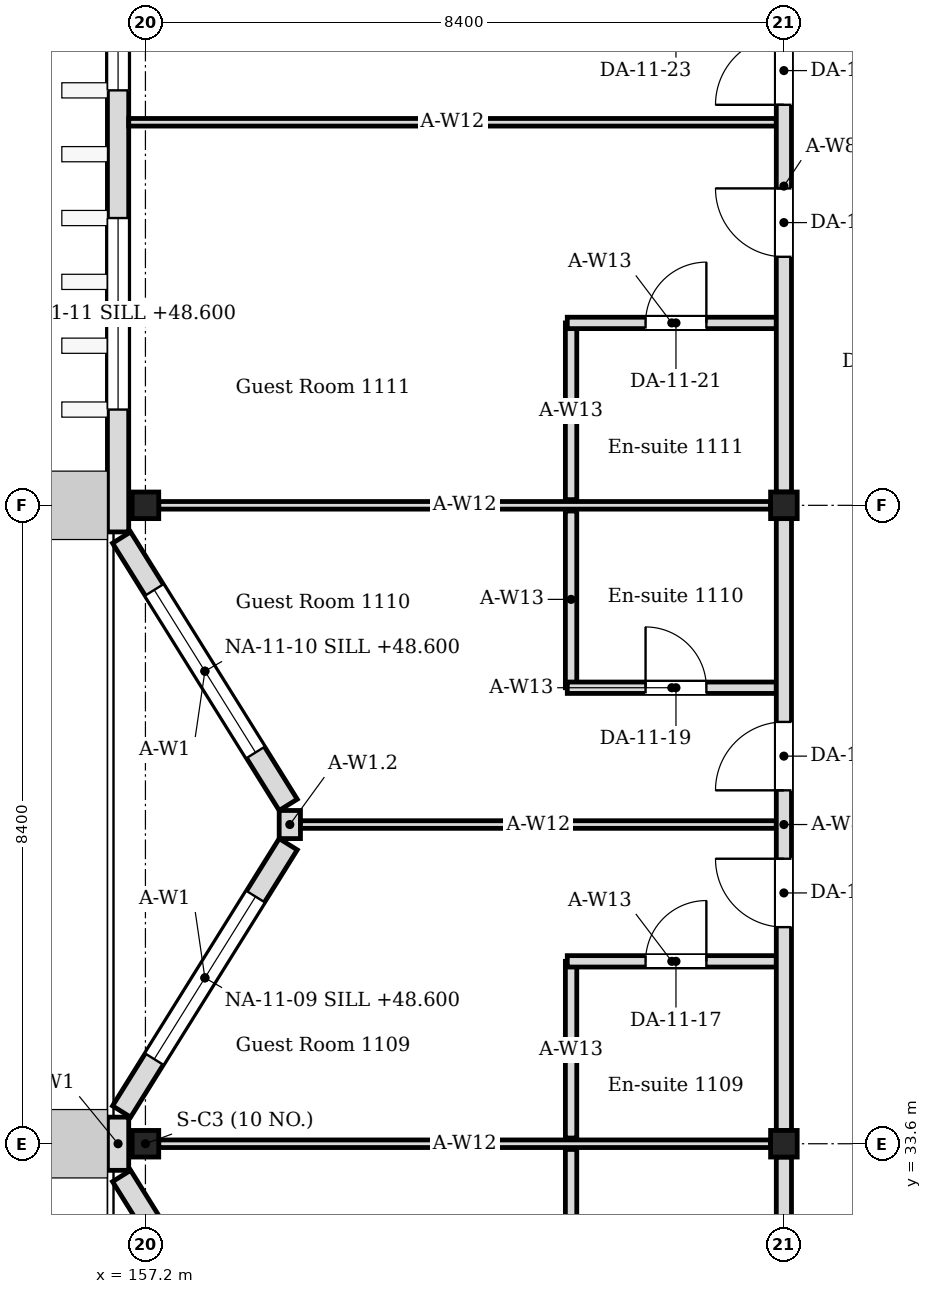
"""IFC4 building model, lengths in metres.
Left out: names, types, materials, properties, quantities, classifications, styles, units other than length and angle.
Written with IfcOpenShell. Run it as: python <this file> out.ifc"""

import sys

from ifc_helpers import new_model, si_unit, direction, frame, frame_2d, origin, origin_2d, place, context, subcontext, project, spatial, rectangle, i_section, extrude, element, fill, save


model = new_model("IFC4")
c1 = context("Model", 3, precision=1e-05, world=origin(), true_north=direction((0.0, 1.0)))
c2 = subcontext(c1, "Body", "Model", "MODEL_VIEW")
j1 = project(units=[si_unit("LENGTHUNIT", "METRE"), si_unit("PLANEANGLEUNIT", "RADIAN")], contexts=[c1])
p1 = place(None, origin())
s1 = spatial("IfcSite", under=j1, at=p1, CompositionType="ELEMENT")
p2 = place(p1, origin())
s2 = spatial("IfcBuilding", under=s1, at=p2, CompositionType="ELEMENT")
p3 = place(p2, frame((0.0, 0.0, 48.0)))
s3 = spatial("IfcBuildingStorey", under=s2, at=p3, CompositionType="ELEMENT", Elevation=48.0)
for number, where, z_axis, x_axis in (
    (1, (157.2, 33.6, 0.0), (0.0, 0.0, 1.0), (1.0, 0.0, 0.0)),
    (2, (157.2, 42.0, 0.0), (0.0, 0.0, 1.0), (1.0, 0.0, 0.0)),
    (3, (165.6, 33.6, 0.0), (0.0, 0.0, 1.0), (1.0, 0.0, 0.0)),
    (4, (165.6, 42.0, 0.0), (0.0, 0.0, 1.0), (1.0, 0.0, 0.0)),
):
    element("IfcColumn", number, at=place(p3, frame(where, z_axis=z_axis, x_axis=x_axis)), inside=s3, PredefinedType="COLUMN", context=c2, shape_type="SweptSolid", body=[
        extrude(i_section(OverallWidth=0.35, OverallDepth=0.35, WebThickness=0.012, FlangeThickness=0.019, FilletRadius=0.013, at=origin_2d()), origin(), (0.0, 0.0, 1.0), 4.2),
    ])
p4 = place(p3, frame((159.079, 29.659, 0.0), z_axis=(0.0, 0.0, 1.0), x_axis=(-0.529018946142, 0.848610013271, 0.0)))
e5 = element("IfcWall", 5, at=p4, inside=s3, PredefinedType="SOLIDWALL", context=c2, shape_type="SweptSolid", body=[
    extrude(rectangle(XDim=4.144, YDim=0.28, at=frame_2d((2.072, 0.0))), origin(), (0.0, 0.0, 1.0), 4.05),
])
p5 = place(p4, frame((0.812, 0.0, 0.6)))
e6 = element("IfcOpeningElement", 6, at=p5, cuts=e5, PredefinedType="OPENING", context=c2, shape_type="SweptSolid", body=[
    extrude(rectangle(XDim=2.52, YDim=2.4, at=frame_2d((1.26, 1.2))), frame((0.0, 0.15, 0.0), z_axis=(0.0, -1.0, 0.0), x_axis=(1.0, 0.0, 0.0)), (0.0, 0.0, 1.0), 0.3),
])
p6 = place(p3, frame((156.84, 33.25, 0.0), z_axis=(0.0, 0.0, 1.0), x_axis=(0.0, 1.0, 0.0)))
e7 = element("IfcWall", 7, at=p6, inside=s3, PredefinedType="SOLIDWALL", context=c2, shape_type="SweptSolid", body=[
    extrude(rectangle(XDim=0.7, YDim=0.28, at=frame_2d((0.35, 0.0))), origin(), (0.0, 0.0, 1.0), 4.05),
])
p7 = place(p3, frame((156.886, 34.024, 0.0), z_axis=(0.0, 0.0, 1.0), x_axis=(0.529018946142, 0.848610013271, 0.0)))
e8 = element("IfcWall", 8, at=p7, inside=s3, PredefinedType="SOLIDWALL", context=c2, shape_type="SweptSolid", body=[
    extrude(rectangle(XDim=4.144, YDim=0.28, at=frame_2d((2.072, 0.0))), origin(), (0.0, 0.0, 1.0), 4.05),
])
p8 = place(p7, frame((0.812, 0.0, 0.6)))
e9 = element("IfcOpeningElement", 9, at=p8, cuts=e8, PredefinedType="OPENING", context=c2, shape_type="SweptSolid", body=[
    extrude(rectangle(XDim=2.52, YDim=2.4, at=frame_2d((1.26, 1.2))), frame((0.0, 0.15, 0.0), z_axis=(0.0, -1.0, 0.0), x_axis=(1.0, 0.0, 0.0)), (0.0, 0.0, 1.0), 0.3),
])
p9 = place(p3, frame((159.079, 38.059, 0.0), z_axis=(0.0, 0.0, 1.0), x_axis=(-0.529018946142, 0.848610013271, 0.0)))
e10 = element("IfcWall", 10, at=p9, inside=s3, PredefinedType="SOLIDWALL", context=c2, shape_type="SweptSolid", body=[
    extrude(rectangle(XDim=4.144, YDim=0.28, at=frame_2d((2.072, 0.0))), origin(), (0.0, 0.0, 1.0), 4.05),
])
p10 = place(p9, frame((0.812, 0.0, 0.6)))
e11 = element("IfcOpeningElement", 11, at=p10, cuts=e10, PredefinedType="OPENING", context=c2, shape_type="SweptSolid", body=[
    extrude(rectangle(XDim=2.52, YDim=2.4, at=frame_2d((1.26, 1.2))), frame((0.0, 0.15, 0.0), z_axis=(0.0, -1.0, 0.0), x_axis=(1.0, 0.0, 0.0)), (0.0, 0.0, 1.0), 0.3),
])
p11 = place(p3, frame((159.1, 37.615, 0.0), z_axis=(0.0, 0.0, 1.0), x_axis=(0.0, 1.0, 0.0)))
e12 = element("IfcWall", 12, at=p11, inside=s3, PredefinedType="SOLIDWALL", context=c2, shape_type="SweptSolid", body=[
    extrude(rectangle(XDim=0.37, YDim=0.28, at=frame_2d((0.185, 0.0))), origin(), (0.0, 0.0, 1.0), 3.604),
])
p12 = place(p3, frame((156.84, 41.65, 0.0), z_axis=(0.0, 0.0, 1.0), x_axis=(0.0, 1.0, 0.0)))
e13 = element("IfcWall", 13, at=p12, inside=s3, PredefinedType="SOLIDWALL", context=c2, shape_type="SweptSolid", body=[
    extrude(rectangle(XDim=25.77, YDim=0.28, at=frame_2d((12.885, 0.0))), origin(), (0.0, 0.0, 1.0), 4.05),
])
p13 = place(p12, frame((1.61, 0.0, 0.6)))
e14 = element("IfcOpeningElement", 14, at=p13, cuts=e13, PredefinedType="OPENING", context=c2, shape_type="SweptSolid", body=[
    extrude(rectangle(XDim=2.52, YDim=2.4, at=frame_2d((1.26, 1.2))), frame((0.0, 0.15, 0.0), z_axis=(0.0, -1.0, 0.0), x_axis=(1.0, 0.0, 0.0)), (0.0, 0.0, 1.0), 0.3),
])
p14 = place(p12, frame((5.81, 0.0, 0.6)))
e15 = element("IfcOpeningElement", 15, at=p14, cuts=e13, PredefinedType="OPENING", context=c2, shape_type="SweptSolid", body=[
    extrude(rectangle(XDim=2.52, YDim=2.4, at=frame_2d((1.26, 1.2))), frame((0.0, 0.15, 0.0), z_axis=(0.0, -1.0, 0.0), x_axis=(1.0, 0.0, 0.0)), (0.0, 0.0, 1.0), 0.3),
])
p15 = place(p12, frame((9.17, 0.0, 0.6)))
e16 = element("IfcOpeningElement", 16, at=p15, cuts=e13, PredefinedType="OPENING", context=c2, shape_type="SweptSolid", body=[
    extrude(rectangle(XDim=2.52, YDim=2.4, at=frame_2d((1.26, 1.2))), frame((0.0, 0.15, 0.0), z_axis=(0.0, -1.0, 0.0), x_axis=(1.0, 0.0, 0.0)), (0.0, 0.0, 1.0), 0.3),
])
p16 = place(p12, frame((13.37, 0.0, 0.6)))
e17 = element("IfcOpeningElement", 17, at=p16, cuts=e13, PredefinedType="OPENING", context=c2, shape_type="SweptSolid", body=[
    extrude(rectangle(XDim=2.52, YDim=2.4, at=frame_2d((1.26, 1.2))), frame((0.0, 0.15, 0.0), z_axis=(0.0, -1.0, 0.0), x_axis=(1.0, 0.0, 0.0)), (0.0, 0.0, 1.0), 0.3),
])
p17 = place(p12, frame((18.41, 0.0, 0.6)))
e18 = element("IfcOpeningElement", 18, at=p17, cuts=e13, PredefinedType="OPENING", context=c2, shape_type="SweptSolid", body=[
    extrude(rectangle(XDim=2.52, YDim=2.4, at=frame_2d((1.26, 1.2))), frame((0.0, 0.15, 0.0), z_axis=(0.0, -1.0, 0.0), x_axis=(1.0, 0.0, 0.0)), (0.0, 0.0, 1.0), 0.3),
])
p18 = place(p12, frame((22.61, 0.0, 0.6)))
e19 = element("IfcOpeningElement", 19, at=p18, cuts=e13, PredefinedType="OPENING", context=c2, shape_type="SweptSolid", body=[
    extrude(rectangle(XDim=2.52, YDim=2.4, at=frame_2d((1.26, 1.2))), frame((0.0, 0.15, 0.0), z_axis=(0.0, -1.0, 0.0), x_axis=(1.0, 0.0, 0.0)), (0.0, 0.0, 1.0), 0.3),
])
for number, where, z_axis, x_axis in (
    (20, (162.8, 31.2, 0.0), (0.0, 0.0, 1.0), (0.0, 1.0, 0.0)),
    (21, (162.8, 33.675, 0.0), (0.0, 0.0, 1.0), (0.0, 1.0, 0.0)),
):
    element("IfcWall", number, at=place(p3, frame(where, z_axis=z_axis, x_axis=x_axis)), inside=s3, PredefinedType="PARTITIONING", context=c2, shape_type="SweptSolid", body=[
        extrude(rectangle(XDim=2.325, YDim=0.15, at=frame_2d((1.163, 0.0))), origin(), (0.0, 0.0, 1.0), 4.05),
    ])
p19 = place(p3, frame((162.75, 36.0, 0.0), z_axis=(0.0, 0.0, 1.0), x_axis=(1.0, 0.0, 0.0)))
e22 = element("IfcWall", 22, at=p19, inside=s3, PredefinedType="PARTITIONING", context=c2, shape_type="SweptSolid", body=[
    extrude(rectangle(XDim=2.75, YDim=0.15, at=frame_2d((1.375, 0.0))), origin(), (0.0, 0.0, 1.0), 4.05),
])
p20 = place(p19, frame((1.03, 0.0, 0.0)))
e23 = element("IfcOpeningElement", 23, at=p20, cuts=e22, PredefinedType="OPENING", context=c2, shape_type="SweptSolid", body=[
    extrude(rectangle(XDim=0.8, YDim=2.1, at=frame_2d((0.4, 1.05))), frame((0.0, 0.085, 0.0), z_axis=(0.0, -1.0, 0.0), x_axis=(1.0, 0.0, 0.0)), (0.0, 0.0, 1.0), 0.17),
])
p21 = place(p3, frame((162.8, 39.6, 0.0), z_axis=(0.0, 0.0, 1.0), x_axis=(0.0, 1.0, 0.0)))
e24 = element("IfcWall", 24, at=p21, inside=s3, PredefinedType="PARTITIONING", context=c2, shape_type="SweptSolid", body=[
    extrude(rectangle(XDim=2.325, YDim=0.15, at=frame_2d((1.163, 0.0))), origin(), (0.0, 0.0, 1.0), 4.05),
])
p22 = place(p3, frame((162.75, 39.6, 0.0), z_axis=(0.0, 0.0, 1.0), x_axis=(1.0, 0.0, 0.0)))
e25 = element("IfcWall", 25, at=p22, inside=s3, PredefinedType="PARTITIONING", context=c2, shape_type="SweptSolid", body=[
    extrude(rectangle(XDim=2.75, YDim=0.15, at=frame_2d((1.375, 0.0))), origin(), (0.0, 0.0, 1.0), 4.05),
])
p23 = place(p22, frame((1.03, 0.0, 0.0)))
e26 = element("IfcOpeningElement", 26, at=p23, cuts=e25, PredefinedType="OPENING", context=c2, shape_type="SweptSolid", body=[
    extrude(rectangle(XDim=0.8, YDim=2.1, at=frame_2d((0.4, 1.05))), frame((0.0, 0.085, 0.0), z_axis=(0.0, -1.0, 0.0), x_axis=(1.0, 0.0, 0.0)), (0.0, 0.0, 1.0), 0.17),
])
p24 = place(p3, frame((162.8, 42.075, 0.0), z_axis=(0.0, 0.0, 1.0), x_axis=(0.0, 1.0, 0.0)))
e27 = element("IfcWall", 27, at=p24, inside=s3, PredefinedType="PARTITIONING", context=c2, shape_type="SweptSolid", body=[
    extrude(rectangle(XDim=2.325, YDim=0.15, at=frame_2d((1.163, 0.0))), origin(), (0.0, 0.0, 1.0), 4.05),
])
p25 = place(p3, frame((162.75, 44.4, 0.0), z_axis=(0.0, 0.0, 1.0), x_axis=(1.0, 0.0, 0.0)))
e28 = element("IfcWall", 28, at=p25, inside=s3, PredefinedType="PARTITIONING", context=c2, shape_type="SweptSolid", body=[
    extrude(rectangle(XDim=2.75, YDim=0.15, at=frame_2d((1.375, 0.0))), origin(), (0.0, 0.0, 1.0), 4.05),
])
p26 = place(p25, frame((1.03, 0.0, 0.0)))
e29 = element("IfcOpeningElement", 29, at=p26, cuts=e28, PredefinedType="OPENING", context=c2, shape_type="SweptSolid", body=[
    extrude(rectangle(XDim=0.8, YDim=2.1, at=frame_2d((0.4, 1.05))), frame((0.0, 0.085, 0.0), z_axis=(0.0, -1.0, 0.0), x_axis=(1.0, 0.0, 0.0)), (0.0, 0.0, 1.0), 0.17),
])
for number, where, z_axis, x_axis in (
    (30, (157.375, 33.6, 0.0), (0.0, 0.0, 1.0), (1.0, 0.0, 0.0)),
    (31, (157.375, 42.0, 0.0), (0.0, 0.0, 1.0), (1.0, 0.0, 0.0)),
):
    element("IfcWall", number, at=place(p3, frame(where, z_axis=z_axis, x_axis=x_axis)), inside=s3, PredefinedType="PARTITIONING", context=c2, shape_type="SweptSolid", body=[
        extrude(rectangle(XDim=8.05, YDim=0.1, at=frame_2d((4.025, 0.0))), origin(), (0.0, 0.0, 1.0), 3.604),
    ])
p27 = place(p3, frame((159.24, 37.8, 0.0), z_axis=(0.0, 0.0, 1.0), x_axis=(1.0, 0.0, 0.0)))
e32 = element("IfcWall", 32, at=p27, inside=s3, PredefinedType="PARTITIONING", context=c2, shape_type="SweptSolid", body=[
    extrude(rectangle(XDim=6.26, YDim=0.1, at=frame_2d((3.13, 0.0))), origin(), (0.0, 0.0, 1.0), 3.604),
])
p28 = place(p3, frame((156.98, 47.04, 0.0), z_axis=(0.0, 0.0, 1.0), x_axis=(1.0, 0.0, 0.0)))
e33 = element("IfcWall", 33, at=p28, inside=s3, PredefinedType="PARTITIONING", context=c2, shape_type="SweptSolid", body=[
    extrude(rectangle(XDim=8.52, YDim=0.1, at=frame_2d((4.26, 0.0))), origin(), (0.0, 0.0, 1.0), 3.604),
])
p29 = place(p3, frame((165.6, 25.375, 0.0), z_axis=(0.0, 0.0, 1.0), x_axis=(0.0, 1.0, 0.0)))
e34 = element("IfcWall", 34, at=p29, inside=s3, PredefinedType="PARTITIONING", context=c2, shape_type="SweptSolid", body=[
    extrude(rectangle(XDim=8.05, YDim=0.2, at=frame_2d((4.025, 0.0))), origin(), (0.0, 0.0, 1.0), 3.45),
])
p30 = place(p29, frame((2.675, 0.0, 0.0)))
e35 = element("IfcOpeningElement", 35, at=p30, cuts=e34, PredefinedType="OPENING", context=c2, shape_type="SweptSolid", body=[
    extrude(rectangle(XDim=0.9, YDim=2.1, at=frame_2d((0.45, 1.05))), frame((0.0, 0.11, 0.0), z_axis=(0.0, -1.0, 0.0), x_axis=(1.0, 0.0, 0.0)), (0.0, 0.0, 1.0), 0.22),
])
p31 = place(p29, frame((4.475, 0.0, 0.0)))
e36 = element("IfcOpeningElement", 36, at=p31, cuts=e34, PredefinedType="OPENING", context=c2, shape_type="SweptSolid", body=[
    extrude(rectangle(XDim=0.9, YDim=2.1, at=frame_2d((0.45, 1.05))), frame((0.0, 0.11, 0.0), z_axis=(0.0, -1.0, 0.0), x_axis=(1.0, 0.0, 0.0)), (0.0, 0.0, 1.0), 0.22),
])
p32 = place(p3, frame((165.6, 33.775, 0.0), z_axis=(0.0, 0.0, 1.0), x_axis=(0.0, 1.0, 0.0)))
e37 = element("IfcWall", 37, at=p32, inside=s3, PredefinedType="PARTITIONING", context=c2, shape_type="SweptSolid", body=[
    extrude(rectangle(XDim=8.05, YDim=0.2, at=frame_2d((4.025, 0.0))), origin(), (0.0, 0.0, 1.0), 3.45),
])
p33 = place(p32, frame((2.675, 0.0, 0.0)))
e38 = element("IfcOpeningElement", 38, at=p33, cuts=e37, PredefinedType="OPENING", context=c2, shape_type="SweptSolid", body=[
    extrude(rectangle(XDim=0.9, YDim=2.1, at=frame_2d((0.45, 1.05))), frame((0.0, 0.11, 0.0), z_axis=(0.0, -1.0, 0.0), x_axis=(1.0, 0.0, 0.0)), (0.0, 0.0, 1.0), 0.22),
])
p34 = place(p32, frame((4.475, 0.0, 0.0)))
e39 = element("IfcOpeningElement", 39, at=p34, cuts=e37, PredefinedType="OPENING", context=c2, shape_type="SweptSolid", body=[
    extrude(rectangle(XDim=0.9, YDim=2.1, at=frame_2d((0.45, 1.05))), frame((0.0, 0.11, 0.0), z_axis=(0.0, -1.0, 0.0), x_axis=(1.0, 0.0, 0.0)), (0.0, 0.0, 1.0), 0.22),
])
p35 = place(p3, frame((165.6, 42.175, 0.0), z_axis=(0.0, 0.0, 1.0), x_axis=(0.0, 1.0, 0.0)))
e40 = element("IfcWall", 40, at=p35, inside=s3, PredefinedType="PARTITIONING", context=c2, shape_type="SweptSolid", body=[
    extrude(rectangle(XDim=8.05, YDim=0.2, at=frame_2d((4.025, 0.0))), origin(), (0.0, 0.0, 1.0), 3.45),
])
p36 = place(p35, frame((3.095, 0.0, 0.0)))
e41 = element("IfcOpeningElement", 41, at=p36, cuts=e40, PredefinedType="OPENING", context=c2, shape_type="SweptSolid", body=[
    extrude(rectangle(XDim=0.9, YDim=2.1, at=frame_2d((0.45, 1.05))), frame((0.0, 0.11, 0.0), z_axis=(0.0, -1.0, 0.0), x_axis=(1.0, 0.0, 0.0)), (0.0, 0.0, 1.0), 0.22),
])
p37 = place(p35, frame((5.095, 0.0, 0.0)))
e42 = element("IfcOpeningElement", 42, at=p37, cuts=e40, PredefinedType="OPENING", context=c2, shape_type="SweptSolid", body=[
    extrude(rectangle(XDim=0.9, YDim=2.1, at=frame_2d((0.45, 1.05))), frame((0.0, 0.11, 0.0), z_axis=(0.0, -1.0, 0.0), x_axis=(1.0, 0.0, 0.0)), (0.0, 0.0, 1.0), 0.22),
])
p38 = place(p8, origin())
e43 = element("IfcWindow", 43, at=p38, inside=s3, PartitioningType="SINGLE_PANEL", PredefinedType="WINDOW", context=c2, shape_type="SweptSolid", body=[
    extrude(rectangle(XDim=2.52, YDim=2.4, at=frame_2d((1.26, 1.2))), frame((0.0, 0.03, 0.0), z_axis=(0.0, -1.0, 0.0), x_axis=(1.0, 0.0, 0.0)), (0.0, 0.0, 1.0), 0.06),
])
fill(e9, e43)
p39 = place(p10, origin())
e44 = element("IfcWindow", 44, at=p39, inside=s3, PartitioningType="SINGLE_PANEL", PredefinedType="WINDOW", context=c2, shape_type="SweptSolid", body=[
    extrude(rectangle(XDim=2.52, YDim=2.4, at=frame_2d((1.26, 1.2))), frame((0.0, 0.03, 0.0), z_axis=(0.0, -1.0, 0.0), x_axis=(1.0, 0.0, 0.0)), (0.0, 0.0, 1.0), 0.06),
])
fill(e11, e44)
p40 = place(p13, origin())
e45 = element("IfcWindow", 45, at=p40, inside=s3, PartitioningType="SINGLE_PANEL", PredefinedType="WINDOW", context=c2, shape_type="SweptSolid", body=[
    extrude(rectangle(XDim=2.52, YDim=2.4, at=frame_2d((1.26, 1.2))), frame((0.0, 0.03, 0.0), z_axis=(0.0, -1.0, 0.0), x_axis=(1.0, 0.0, 0.0)), (0.0, 0.0, 1.0), 0.06),
])
fill(e14, e45)
p41 = place(p14, origin())
e46 = element("IfcWindow", 46, at=p41, inside=s3, PartitioningType="SINGLE_PANEL", PredefinedType="WINDOW", context=c2, shape_type="SweptSolid", body=[
    extrude(rectangle(XDim=2.52, YDim=2.4, at=frame_2d((1.26, 1.2))), frame((0.0, 0.03, 0.0), z_axis=(0.0, -1.0, 0.0), x_axis=(1.0, 0.0, 0.0)), (0.0, 0.0, 1.0), 0.06),
])
fill(e15, e46)
p42 = place(p20, origin())
e47 = element("IfcDoor", 47, at=p42, inside=s3, OperationType="SINGLE_SWING_RIGHT", PredefinedType="DOOR", context=c2, shape_type="SweptSolid", body=[
    extrude(rectangle(XDim=0.8, YDim=2.1, at=frame_2d((0.4, 1.05))), frame((0.0, 0.025, 0.0), z_axis=(0.0, -1.0, 0.0), x_axis=(1.0, 0.0, 0.0)), (0.0, 0.0, 1.0), 0.05),
])
fill(e23, e47)
p43 = place(p33, origin())
e48 = element("IfcDoor", 48, at=p43, inside=s3, OperationType="SINGLE_SWING_RIGHT", PredefinedType="DOOR", context=c2, shape_type="SweptSolid", body=[
    extrude(rectangle(XDim=0.9, YDim=2.1, at=frame_2d((0.45, 1.05))), frame((0.0, 0.025, 0.0), z_axis=(0.0, -1.0, 0.0), x_axis=(1.0, 0.0, 0.0)), (0.0, 0.0, 1.0), 0.05),
])
fill(e38, e48)
p44 = place(p23, origin())
e49 = element("IfcDoor", 49, at=p44, inside=s3, OperationType="SINGLE_SWING_LEFT", PredefinedType="DOOR", context=c2, shape_type="SweptSolid", body=[
    extrude(rectangle(XDim=0.8, YDim=2.1, at=frame_2d((0.4, 1.05))), frame((0.0, 0.025, 0.0), z_axis=(0.0, -1.0, 0.0), x_axis=(1.0, 0.0, 0.0)), (0.0, 0.0, 1.0), 0.05),
])
fill(e26, e49)
p45 = place(p34, origin())
e50 = element("IfcDoor", 50, at=p45, inside=s3, OperationType="SINGLE_SWING_LEFT", PredefinedType="DOOR", context=c2, shape_type="SweptSolid", body=[
    extrude(rectangle(XDim=0.9, YDim=2.1, at=frame_2d((0.45, 1.05))), frame((0.0, 0.025, 0.0), z_axis=(0.0, -1.0, 0.0), x_axis=(1.0, 0.0, 0.0)), (0.0, 0.0, 1.0), 0.05),
])
fill(e39, e50)
p46 = place(p26, origin())
e51 = element("IfcDoor", 51, at=p46, inside=s3, OperationType="SINGLE_SWING_RIGHT", PredefinedType="DOOR", context=c2, shape_type="SweptSolid", body=[
    extrude(rectangle(XDim=0.8, YDim=2.1, at=frame_2d((0.4, 1.05))), frame((0.0, 0.025, 0.0), z_axis=(0.0, -1.0, 0.0), x_axis=(1.0, 0.0, 0.0)), (0.0, 0.0, 1.0), 0.05),
])
fill(e29, e51)
p47 = place(p36, origin())
e52 = element("IfcDoor", 52, at=p47, inside=s3, OperationType="SINGLE_SWING_RIGHT", PredefinedType="DOOR", context=c2, shape_type="SweptSolid", body=[
    extrude(rectangle(XDim=0.9, YDim=2.1, at=frame_2d((0.45, 1.05))), frame((0.0, 0.025, 0.0), z_axis=(0.0, -1.0, 0.0), x_axis=(1.0, 0.0, 0.0)), (0.0, 0.0, 1.0), 0.05),
])
fill(e41, e52)
p48 = place(p37, origin())
e53 = element("IfcDoor", 53, at=p48, inside=s3, OperationType="SINGLE_SWING_LEFT", PredefinedType="DOOR", context=c2, shape_type="SweptSolid", body=[
    extrude(rectangle(XDim=0.9, YDim=2.1, at=frame_2d((0.45, 1.05))), frame((0.0, 0.025, 0.0), z_axis=(0.0, -1.0, 0.0), x_axis=(1.0, 0.0, 0.0)), (0.0, 0.0, 1.0), 0.05),
])
fill(e42, e53)
save(model, sys.argv[1])
